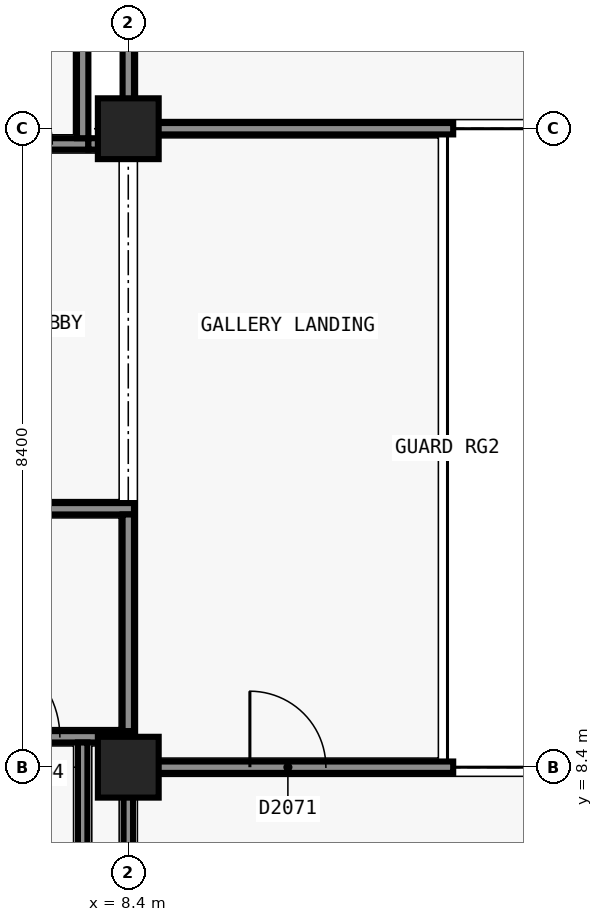
"""IFC4 building model, lengths in metres.
Left out: names, types, materials, properties, quantities, classifications, styles, units other than length and angle.
Written with IfcOpenShell. Run it as: python <this file> out.ifc"""

import sys

from ifc_helpers import new_model, si_unit, direction, frame, frame_2d, origin, origin_2d, place, context, subcontext, project, spatial, rectangle, extrude, element, fill, save


model = new_model("IFC4")
c1 = context("Model", 3, precision=1e-05, world=origin(), true_north=direction((0.0, 1.0)))
c2 = subcontext(c1, "Body", "Model", "MODEL_VIEW")
j1 = project(units=[si_unit("LENGTHUNIT", "METRE"), si_unit("PLANEANGLEUNIT", "RADIAN")], contexts=[c1])
p1 = place(None, origin())
s1 = spatial("IfcSite", under=j1, at=p1, CompositionType="ELEMENT")
p2 = place(p1, origin())
s2 = spatial("IfcBuilding", under=s1, at=p2, CompositionType="ELEMENT")
p3 = place(p2, frame((0.0, 0.0, 10.2)))
s3 = spatial("IfcBuildingStorey", under=s2, at=p3, CompositionType="ELEMENT", Elevation=10.2)
for number, where, z_axis, x_axis in (
    (1, (8.4, 8.4, 0.0), (0.0, 0.0, 1.0), (1.0, 0.0, 0.0)),
    (2, (8.4, 16.8, 0.0), (0.0, 0.0, 1.0), (1.0, 0.0, 0.0)),
):
    element("IfcColumn", number, at=place(p3, frame(where, z_axis=z_axis, x_axis=x_axis)), inside=s3, PredefinedType="COLUMN", context=c2, shape_type="SweptSolid", body=[
        extrude(rectangle(XDim=0.8, YDim=0.8, at=origin_2d()), origin(), (0.0, 0.0, 1.0), 4.8),
    ])
p4 = place(p3, frame((8.325, 8.4, 0.0), z_axis=(0.0, 0.0, 1.0), x_axis=(1.0, 0.0, 0.0)))
e3 = element("IfcWall", 3, at=p4, inside=s3, PredefinedType="PARTITIONING", context=c2, shape_type="SweptSolid", body=[
    extrude(rectangle(XDim=4.35, YDim=0.15, at=frame_2d((2.175, 0.0))), origin(), (0.0, 0.0, 1.0), 3.8),
])
p5 = place(p4, frame((1.675, 0.0, 0.0)))
e4 = element("IfcOpeningElement", 4, at=p5, cuts=e3, PredefinedType="OPENING", context=c2, shape_type="SweptSolid", body=[
    extrude(rectangle(XDim=1.0, YDim=2.1, at=frame_2d((0.5, 1.05))), frame((0.0, 0.085, 0.0), z_axis=(0.0, -1.0, 0.0), x_axis=(1.0, 0.0, 0.0)), (0.0, 0.0, 1.0), 0.17),
])
p6 = place(p3, frame((6.1, 16.6, 0.0), z_axis=(0.0, 0.0, 1.0), x_axis=(1.0, 0.0, 0.0)))
e5 = element("IfcWall", 5, at=p6, inside=s3, PredefinedType="PARTITIONING", context=c2, shape_type="SweptSolid", body=[
    extrude(rectangle(XDim=1.775, YDim=0.15, at=frame_2d((0.887, 0.0))), origin(), (0.0, 0.0, 1.0), 4.0),
])
p7 = place(p6, frame((0.3, 0.0, 0.0)))
e6 = element("IfcOpeningElement", 6, at=p7, cuts=e5, PredefinedType="OPENING", context=c2, shape_type="SweptSolid", body=[
    extrude(rectangle(XDim=1.0, YDim=2.1, at=frame_2d((0.5, 1.05))), frame((0.0, 0.085, 0.0), z_axis=(0.0, -1.0, 0.0), x_axis=(1.0, 0.0, 0.0)), (0.0, 0.0, 1.0), 0.17),
])
p8 = place(p3, frame((8.325, 16.8, 0.0), z_axis=(0.0, 0.0, 1.0), x_axis=(1.0, 0.0, 0.0)))
e7 = element("IfcWall", 7, at=p8, inside=s3, PredefinedType="PARTITIONING", context=c2, shape_type="SweptSolid", body=[
    extrude(rectangle(XDim=4.35, YDim=0.15, at=frame_2d((2.175, 0.0))), origin(), (0.0, 0.0, 1.0), 3.8),
])
p9 = place(p3, frame((6.1, 8.8, 0.0), z_axis=(0.0, 0.0, 1.0), x_axis=(1.0, 0.0, 0.0)))
e8 = element("IfcWall", 8, at=p9, inside=s3, PredefinedType="SOLIDWALL", context=c2, shape_type="SweptSolid", body=[
    extrude(rectangle(XDim=2.375, YDim=0.15, at=frame_2d((1.188, 0.0))), origin(), (0.0, 0.0, 1.0), 3.8),
])
p10 = place(p9, frame((0.2, 0.0, 0.0)))
e9 = element("IfcOpeningElement", 9, at=p10, cuts=e8, PredefinedType="OPENING", context=c2, shape_type="SweptSolid", body=[
    extrude(rectangle(XDim=1.2, YDim=2.1, at=frame_2d((0.6, 1.05))), frame((0.0, 0.085, 0.0), z_axis=(0.0, -1.0, 0.0), x_axis=(1.0, 0.0, 0.0)), (0.0, 0.0, 1.0), 0.17),
])
p11 = place(p3, frame((3.3, 11.8, 0.0), z_axis=(0.0, 0.0, 1.0), x_axis=(1.0, 0.0, 0.0)))
e10 = element("IfcWall", 10, at=p11, inside=s3, PredefinedType="SOLIDWALL", context=c2, shape_type="SweptSolid", body=[
    extrude(rectangle(XDim=5.175, YDim=0.15, at=frame_2d((2.587, 0.0))), origin(), (0.0, 0.0, 1.0), 3.8),
])
p12 = place(p3, frame((7.875, 16.6, 0.0), z_axis=(0.0, 0.0, 1.0), x_axis=(1.0, 0.0, 0.0)))
e11 = element("IfcWall", 11, at=p12, inside=s3, PredefinedType="SOLIDWALL", context=c2, shape_type="SweptSolid", body=[
    extrude(rectangle(XDim=0.6, YDim=0.15, at=frame_2d((0.3, 0.0))), origin(), (0.0, 0.0, 1.0), 3.8),
])
p13 = place(p3, frame((8.4, 8.475, 0.0), z_axis=(0.0, 0.0, 1.0), x_axis=(0.0, 1.0, 0.0)))
e12 = element("IfcWall", 12, at=p13, inside=s3, PredefinedType="PARTITIONING", context=c2, shape_type="SweptSolid", body=[
    extrude(rectangle(XDim=0.25, YDim=0.15, at=frame_2d((0.125, 0.0))), origin(), (0.0, 0.0, 1.0), 3.8),
])
p14 = place(p3, frame((8.4, 8.875, 0.0), z_axis=(0.0, 0.0, 1.0), x_axis=(0.0, 1.0, 0.0)))
e13 = element("IfcWall", 13, at=p14, inside=s3, PredefinedType="SOLIDWALL", context=c2, shape_type="SweptSolid", body=[
    extrude(rectangle(XDim=2.85, YDim=0.15, at=frame_2d((1.425, 0.0))), origin(), (0.0, 0.0, 1.0), 3.8),
])
p15 = place(p3, frame((7.8, 16.675, 0.0), z_axis=(0.0, 0.0, 1.0), x_axis=(0.0, 1.0, 0.0)))
e14 = element("IfcWall", 14, at=p15, inside=s3, PredefinedType="SOLIDWALL", context=c2, shape_type="SweptSolid", body=[
    extrude(rectangle(XDim=1.65, YDim=0.15, at=frame_2d((0.825, 0.0))), origin(), (0.0, 0.0, 1.0), 4.0),
])
p16 = place(p3, frame((8.4, 16.875, 0.0), z_axis=(0.0, 0.0, 1.0), x_axis=(0.0, 1.0, 0.0)))
e15 = element("IfcWall", 15, at=p16, inside=s3, PredefinedType="SOLIDWALL", context=c2, shape_type="SweptSolid", body=[
    extrude(rectangle(XDim=7.575, YDim=0.15, at=frame_2d((3.788, 0.0))), origin(), (0.0, 0.0, 1.0), 3.8),
])
p17 = place(p3, frame((7.8, 7.062, 0.0), z_axis=(0.0, 0.0, 1.0), x_axis=(0.0, 1.0, 0.0)))
e16 = element("IfcWall", 16, at=p17, inside=s3, PredefinedType="PARTITIONING", context=c2, shape_type="SweptSolid", body=[
    extrude(rectangle(XDim=1.663, YDim=0.125, at=frame_2d((0.831, 0.0))), origin(), (0.0, 0.0, 1.0), 4.0),
])
p18 = place(p3, frame((8.4, 0.75, 0.0), z_axis=(0.0, 0.0, 1.0), x_axis=(0.0, 1.0, 0.0)))
e17 = element("IfcWall", 17, at=p18, inside=s3, PredefinedType="PARTITIONING", context=c2, shape_type="SweptSolid", body=[
    extrude(rectangle(XDim=7.575, YDim=0.125, at=frame_2d((3.788, 0.0))), origin(), (0.0, 0.0, 1.0), 3.8),
])
p19 = place(p10, origin())
e18 = element("IfcDoor", 18, at=p19, inside=s3, OperationType="SINGLE_SWING_RIGHT", PredefinedType="DOOR", context=c2, shape_type="SweptSolid", body=[
    extrude(rectangle(XDim=1.2, YDim=2.1, at=frame_2d((0.6, 1.05))), frame((0.0, 0.025, 0.0), z_axis=(0.0, -1.0, 0.0), x_axis=(1.0, 0.0, 0.0)), (0.0, 0.0, 1.0), 0.05),
])
fill(e9, e18)
p20 = place(p7, origin())
e19 = element("IfcDoor", 19, at=p20, inside=s3, OperationType="SINGLE_SWING_RIGHT", PredefinedType="DOOR", context=c2, shape_type="SweptSolid", body=[
    extrude(rectangle(XDim=1.0, YDim=2.1, at=frame_2d((0.5, 1.05))), frame((0.0, 0.025, 0.0), z_axis=(0.0, -1.0, 0.0), x_axis=(1.0, 0.0, 0.0)), (0.0, 0.0, 1.0), 0.05),
])
fill(e6, e19)
p21 = place(p5, origin())
e20 = element("IfcDoor", 20, at=p21, inside=s3, OperationType="SINGLE_SWING_RIGHT", PredefinedType="DOOR", context=c2, shape_type="SweptSolid", body=[
    extrude(rectangle(XDim=1.0, YDim=2.1, at=frame_2d((0.5, 1.05))), frame((0.0, 0.025, 0.0), z_axis=(0.0, -1.0, 0.0), x_axis=(1.0, 0.0, 0.0)), (0.0, 0.0, 1.0), 0.05),
])
fill(e4, e20)
save(model, sys.argv[1])
